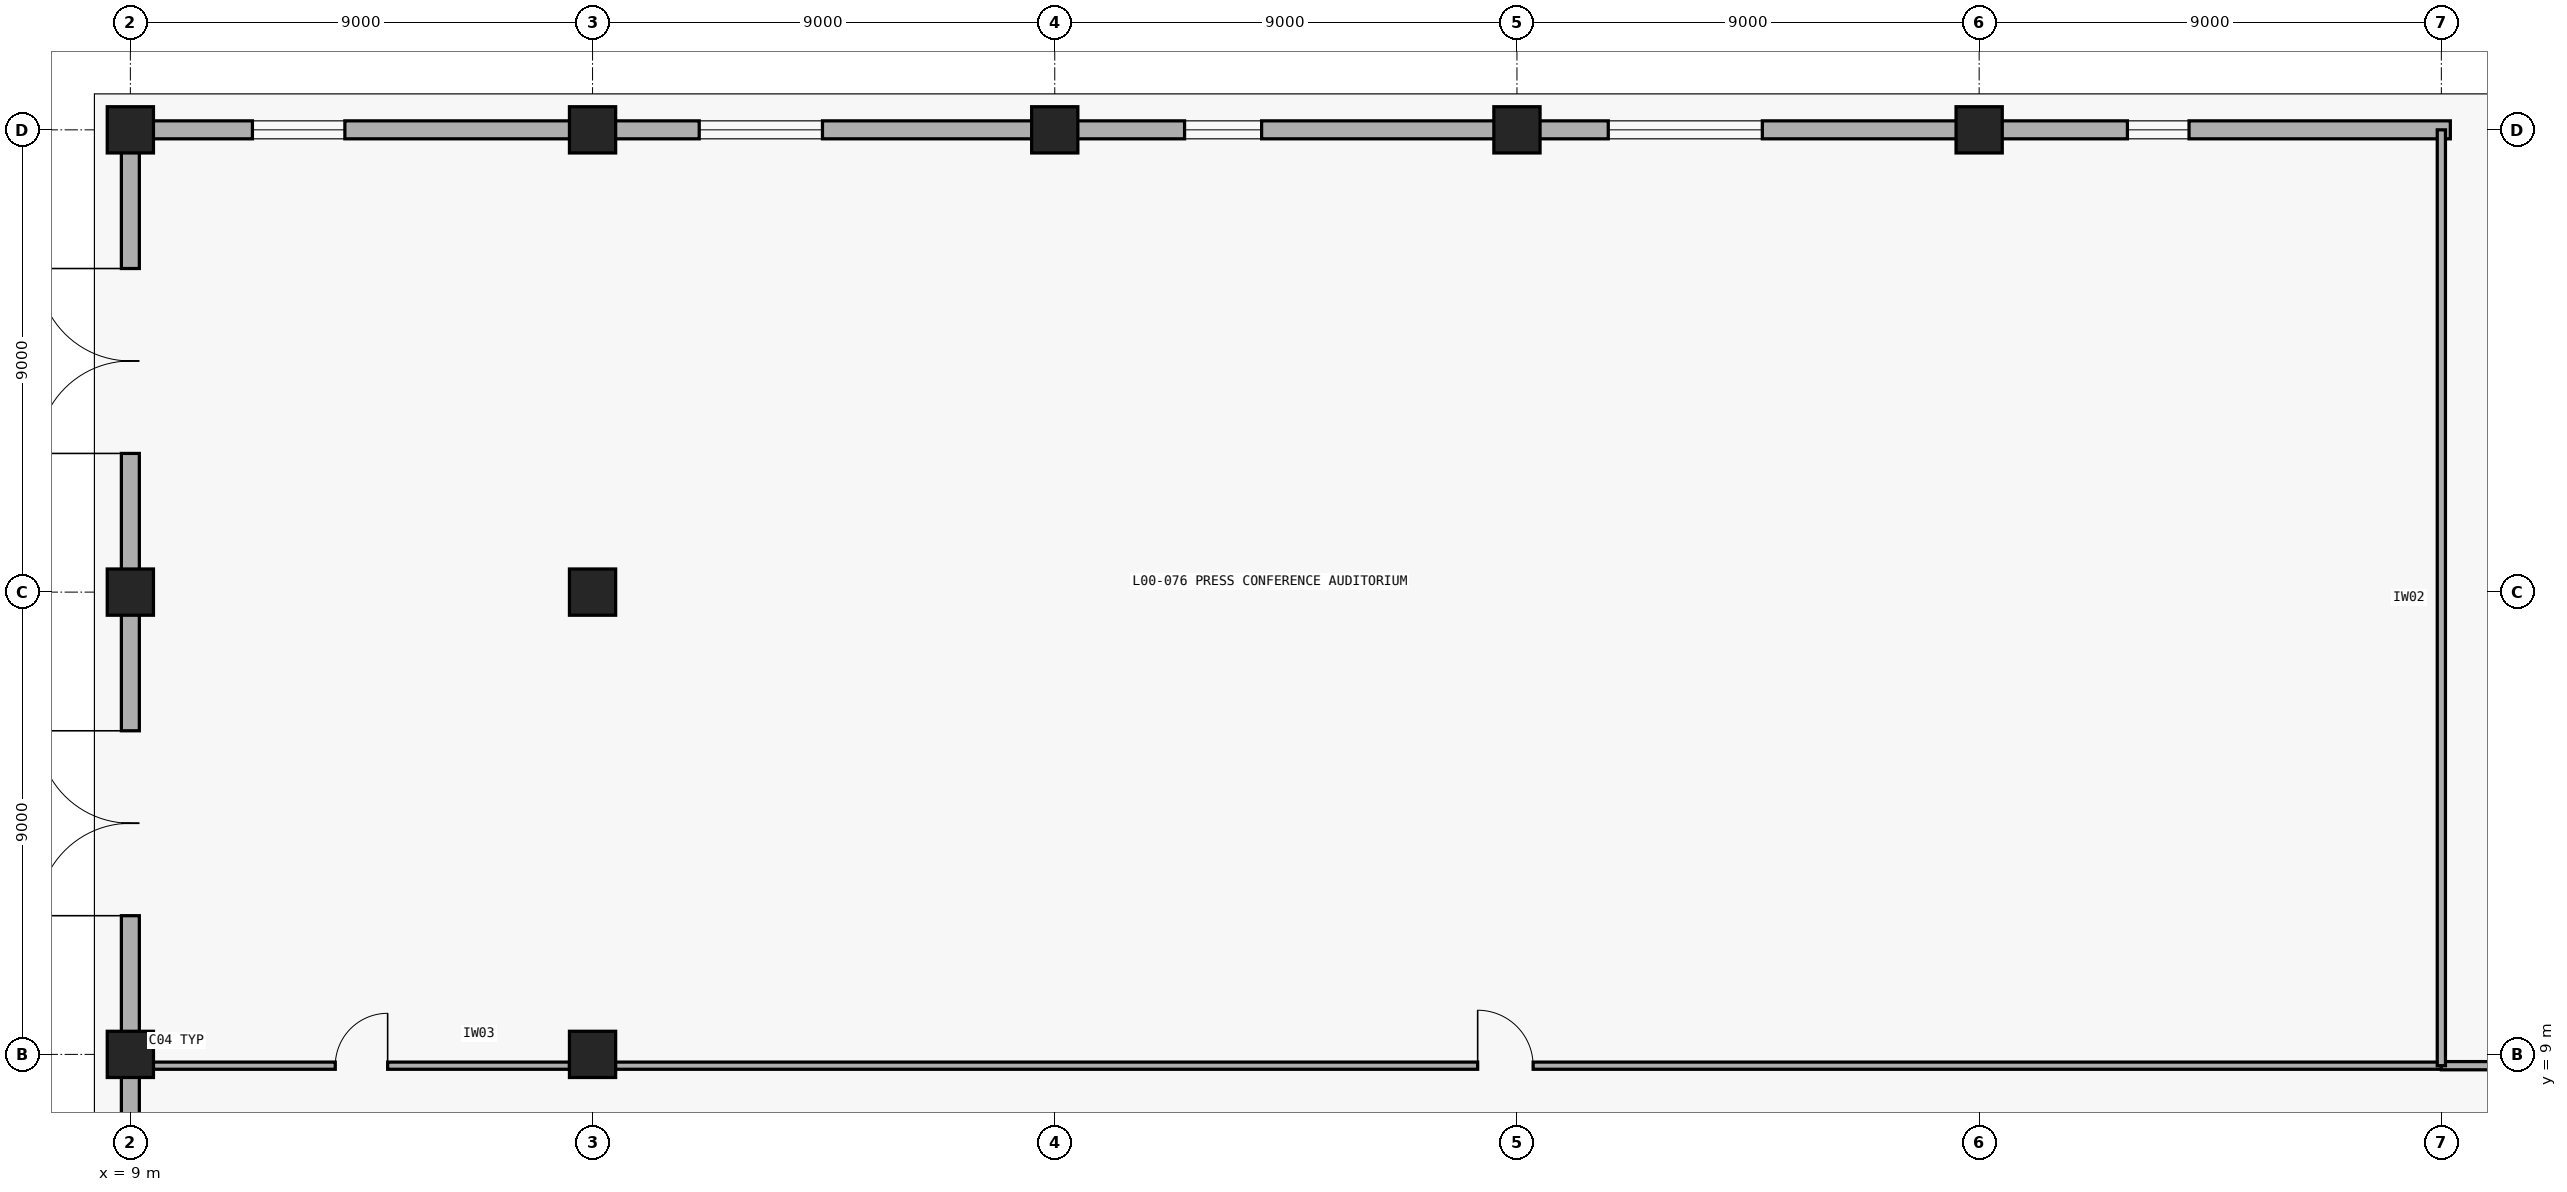
"""IFC4 building model, lengths in metres.
Left out: names, types, materials, properties, quantities, classifications, styles, units other than length and angle.
Written with IfcOpenShell. Run it as: python <this file> out.ifc"""

import sys

from ifc_helpers import new_model, si_unit, direction, frame, frame_2d, origin, origin_2d, place, context, subcontext, project, spatial, rectangle, extrude, element, fill, save


model = new_model("IFC4")
c1 = context("Model", 3, precision=1e-05, world=origin(), true_north=direction((0.0, 1.0)))
c2 = subcontext(c1, "Body", "Model", "MODEL_VIEW")
j1 = project(units=[si_unit("LENGTHUNIT", "METRE"), si_unit("PLANEANGLEUNIT", "RADIAN")], contexts=[c1])
p1 = place(None, origin())
s1 = spatial("IfcSite", under=j1, at=p1, CompositionType="ELEMENT")
p2 = place(p1, origin())
s2 = spatial("IfcBuilding", under=s1, at=p2, CompositionType="ELEMENT")
p3 = place(p2, origin())
s3 = spatial("IfcBuildingStorey", under=s2, at=p3, CompositionType="ELEMENT", Elevation=0.0)
for number, where, z_axis, x_axis in (
    (1, (9.0, 9.0, 0.0), (0.0, 0.0, 1.0), (1.0, 0.0, 0.0)),
    (2, (9.0, 18.0, 0.0), (0.0, 0.0, 1.0), (1.0, 0.0, 0.0)),
    (3, (9.0, 27.0, 0.0), (0.0, 0.0, 1.0), (1.0, 0.0, 0.0)),
    (4, (18.0, 9.0, 0.0), (0.0, 0.0, 1.0), (1.0, 0.0, 0.0)),
    (5, (18.0, 18.0, 0.0), (0.0, 0.0, 1.0), (1.0, 0.0, 0.0)),
    (6, (18.0, 27.0, 0.0), (0.0, 0.0, 1.0), (1.0, 0.0, 0.0)),
    (7, (27.0, 27.0, 0.0), (0.0, 0.0, 1.0), (1.0, 0.0, 0.0)),
    (8, (36.0, 27.0, 0.0), (0.0, 0.0, 1.0), (1.0, 0.0, 0.0)),
    (9, (45.0, 27.0, 0.0), (0.0, 0.0, 1.0), (1.0, 0.0, 0.0)),
):
    element("IfcColumn", number, at=place(p3, frame(where, z_axis=z_axis, x_axis=x_axis)), inside=s3, PredefinedType="COLUMN", context=c2, shape_type="SweptSolid", body=[
        extrude(rectangle(XDim=0.9, YDim=0.9, at=origin_2d()), origin(), (0.0, 0.0, 1.0), 5.4),
    ])
p4 = place(p3, frame((66.407, 27.071, 0.0), z_axis=(0.0, 0.0, 1.0), x_axis=(-0.842308733224, 0.538995359845, 0.0)))
e10 = element("IfcWall", 10, at=p4, inside=s3, PredefinedType="STANDARD", context=c2, shape_type="SweptSolid", body=[
    extrude(rectangle(XDim=21.139, YDim=0.35, at=frame_2d((10.57, 0.0))), origin(), (0.0, 0.0, 1.0), 4.165),
])
p5 = place(p4, frame((12.556, 0.0, 0.0)))
e11 = element("IfcOpeningElement", 11, at=p5, cuts=e10, PredefinedType="OPENING", context=c2, shape_type="SweptSolid", body=[
    extrude(rectangle(XDim=1.95, YDim=2.25, at=frame_2d((0.975, 1.125))), frame((0.0, 0.185, 0.0), z_axis=(0.0, -1.0, 0.0), x_axis=(1.0, 0.0, 0.0)), (0.0, 0.0, 1.0), 0.37),
])
p6 = place(p4, frame((1.51, 0.0, 0.0)))
e12 = element("IfcOpeningElement", 12, at=p6, cuts=e10, PredefinedType="OPENING", context=c2, shape_type="SweptSolid", body=[
    extrude(rectangle(XDim=2.9, YDim=2.52, at=frame_2d((1.45, 1.26))), frame((0.0, 0.185, 0.0), z_axis=(0.0, -1.0, 0.0), x_axis=(1.0, 0.0, 0.0)), (0.0, 0.0, 1.0), 0.37),
])
p7 = place(p3, frame((9.0, 0.425, 0.0), z_axis=(0.0, 0.0, 1.0), x_axis=(0.0, 1.0, 0.0)))
e13 = element("IfcWall", 13, at=p7, inside=s3, PredefinedType="STANDARD", context=c2, shape_type="SweptSolid", body=[
    extrude(rectangle(XDim=8.15, YDim=0.35, at=frame_2d((4.075, 0.0))), origin(), (0.0, 0.0, 1.0), 4.417),
])
p8 = place(p7, frame((2.275, 0.0, 0.0)))
e14 = element("IfcOpeningElement", 14, at=p8, cuts=e13, PredefinedType="OPENING", context=c2, shape_type="SweptSolid", body=[
    extrude(rectangle(XDim=3.6, YDim=2.7, at=frame_2d((1.8, 1.35))), frame((0.0, 0.185, 0.0), z_axis=(0.0, -1.0, 0.0), x_axis=(1.0, 0.0, 0.0)), (0.0, 0.0, 1.0), 0.37),
])
p9 = place(p3, frame((9.0, 9.425, 0.0), z_axis=(0.0, 0.0, 1.0), x_axis=(0.0, 1.0, 0.0)))
e15 = element("IfcWall", 15, at=p9, inside=s3, PredefinedType="STANDARD", context=c2, shape_type="SweptSolid", body=[
    extrude(rectangle(XDim=8.15, YDim=0.35, at=frame_2d((4.075, 0.0))), origin(), (0.0, 0.0, 1.0), 4.417),
])
p10 = place(p9, frame((2.275, 0.0, 0.0)))
e16 = element("IfcOpeningElement", 16, at=p10, cuts=e15, PredefinedType="OPENING", context=c2, shape_type="SweptSolid", body=[
    extrude(rectangle(XDim=3.6, YDim=2.7, at=frame_2d((1.8, 1.35))), frame((0.0, 0.185, 0.0), z_axis=(0.0, -1.0, 0.0), x_axis=(1.0, 0.0, 0.0)), (0.0, 0.0, 1.0), 0.37),
])
p11 = place(p3, frame((9.0, 18.425, 0.0), z_axis=(0.0, 0.0, 1.0), x_axis=(0.0, 1.0, 0.0)))
e17 = element("IfcWall", 17, at=p11, inside=s3, PredefinedType="STANDARD", context=c2, shape_type="SweptSolid", body=[
    extrude(rectangle(XDim=8.15, YDim=0.35, at=frame_2d((4.075, 0.0))), origin(), (0.0, 0.0, 1.0), 4.417),
])
p12 = place(p11, frame((2.275, 0.0, 0.0)))
e18 = element("IfcOpeningElement", 18, at=p12, cuts=e17, PredefinedType="OPENING", context=c2, shape_type="SweptSolid", body=[
    extrude(rectangle(XDim=3.6, YDim=2.7, at=frame_2d((1.8, 1.35))), frame((0.0, 0.185, 0.0), z_axis=(0.0, -1.0, 0.0), x_axis=(1.0, 0.0, 0.0)), (0.0, 0.0, 1.0), 0.37),
])
p13 = place(p3, frame((9.425, 27.0, 0.0), z_axis=(0.0, 0.0, 1.0), x_axis=(1.0, 0.0, 0.0)))
e19 = element("IfcWall", 19, at=p13, inside=s3, PredefinedType="STANDARD", context=c2, shape_type="SweptSolid", body=[
    extrude(rectangle(XDim=8.15, YDim=0.35, at=frame_2d((4.075, 0.0))), origin(), (0.0, 0.0, 1.0), 4.384),
])
p14 = place(p13, frame((1.952, 0.0, 0.95)))
e20 = element("IfcOpeningElement", 20, at=p14, cuts=e19, PredefinedType="OPENING", context=c2, shape_type="SweptSolid", body=[
    extrude(rectangle(XDim=1.8, YDim=2.2, at=frame_2d((0.9, 1.1))), frame((0.0, 0.185, 0.0), z_axis=(0.0, -1.0, 0.0), x_axis=(1.0, 0.0, 0.0)), (0.0, 0.0, 1.0), 0.37),
])
p15 = place(p3, frame((18.425, 27.0, 0.0), z_axis=(0.0, 0.0, 1.0), x_axis=(1.0, 0.0, 0.0)))
e21 = element("IfcWall", 21, at=p15, inside=s3, PredefinedType="STANDARD", context=c2, shape_type="SweptSolid", body=[
    extrude(rectangle(XDim=8.15, YDim=0.35, at=frame_2d((4.075, 0.0))), origin(), (0.0, 0.0, 1.0), 4.384),
])
p16 = place(p15, frame((1.652, 0.0, 0.95)))
e22 = element("IfcOpeningElement", 22, at=p16, cuts=e21, PredefinedType="OPENING", context=c2, shape_type="SweptSolid", body=[
    extrude(rectangle(XDim=2.4, YDim=2.2, at=frame_2d((1.2, 1.1))), frame((0.0, 0.185, 0.0), z_axis=(0.0, -1.0, 0.0), x_axis=(1.0, 0.0, 0.0)), (0.0, 0.0, 1.0), 0.37),
])
p17 = place(p3, frame((27.425, 27.0, 0.0), z_axis=(0.0, 0.0, 1.0), x_axis=(1.0, 0.0, 0.0)))
e23 = element("IfcWall", 23, at=p17, inside=s3, PredefinedType="STANDARD", context=c2, shape_type="SweptSolid", body=[
    extrude(rectangle(XDim=8.15, YDim=0.35, at=frame_2d((4.075, 0.0))), origin(), (0.0, 0.0, 1.0), 4.384),
])
p18 = place(p17, frame((2.103, 0.0, 0.95)))
e24 = element("IfcOpeningElement", 24, at=p18, cuts=e23, PredefinedType="OPENING", context=c2, shape_type="SweptSolid", body=[
    extrude(rectangle(XDim=1.5, YDim=2.0, at=frame_2d((0.75, 1.0))), frame((0.0, 0.185, 0.0), z_axis=(0.0, -1.0, 0.0), x_axis=(1.0, 0.0, 0.0)), (0.0, 0.0, 1.0), 0.37),
])
p19 = place(p3, frame((36.425, 27.0, 0.0), z_axis=(0.0, 0.0, 1.0), x_axis=(1.0, 0.0, 0.0)))
e25 = element("IfcWall", 25, at=p19, inside=s3, PredefinedType="STANDARD", context=c2, shape_type="SweptSolid", body=[
    extrude(rectangle(XDim=8.15, YDim=0.35, at=frame_2d((4.075, 0.0))), origin(), (0.0, 0.0, 1.0), 4.384),
])
p20 = place(p19, frame((1.353, 0.0, 0.95)))
e26 = element("IfcOpeningElement", 26, at=p20, cuts=e25, PredefinedType="OPENING", context=c2, shape_type="SweptSolid", body=[
    extrude(rectangle(XDim=3.0, YDim=2.3, at=frame_2d((1.5, 1.15))), frame((0.0, 0.185, 0.0), z_axis=(0.0, -1.0, 0.0), x_axis=(1.0, 0.0, 0.0)), (0.0, 0.0, 1.0), 0.37),
])
p21 = place(p3, frame((45.425, 27.0, 0.0), z_axis=(0.0, 0.0, 1.0), x_axis=(1.0, 0.0, 0.0)))
e27 = element("IfcWall", 27, at=p21, inside=s3, PredefinedType="STANDARD", context=c2, shape_type="SweptSolid", body=[
    extrude(rectangle(XDim=8.75, YDim=0.35, at=frame_2d((4.375, 0.0))), origin(), (0.0, 0.0, 1.0), 5.1),
])
p22 = place(p21, frame((2.462, 0.0, 0.95)))
e28 = element("IfcOpeningElement", 28, at=p22, cuts=e27, PredefinedType="OPENING", context=c2, shape_type="SweptSolid", body=[
    extrude(rectangle(XDim=1.2, YDim=1.8, at=frame_2d((0.6, 0.9))), frame((0.0, 0.185, 0.0), z_axis=(0.0, -1.0, 0.0), x_axis=(1.0, 0.0, 0.0)), (0.0, 0.0, 1.0), 0.37),
])
p23 = place(p3, frame((9.435, 8.78, 0.0), z_axis=(0.0, 0.0, 1.0), x_axis=(1.0, 0.0, 0.0)))
e29 = element("IfcWall", 29, at=p23, inside=s3, PredefinedType="PARTITIONING", context=c2, shape_type="SweptSolid", body=[
    extrude(rectangle(XDim=8.13, YDim=0.14, at=frame_2d((4.065, 0.0))), origin(), (0.0, 0.0, 1.0), 4.384),
])
p24 = place(p23, frame((3.555, 0.0, 0.0)))
e30 = element("IfcOpeningElement", 30, at=p24, cuts=e29, PredefinedType="OPENING", context=c2, shape_type="SweptSolid", body=[
    extrude(rectangle(XDim=1.02, YDim=2.2, at=frame_2d((0.51, 1.1))), frame((0.0, 0.08, 0.0), z_axis=(0.0, -1.0, 0.0), x_axis=(1.0, 0.0, 0.0)), (0.0, 0.0, 1.0), 0.16),
])
p25 = place(p3, frame((17.55, 8.78, 0.0), z_axis=(0.0, 0.0, 1.0), x_axis=(1.0, 0.0, 0.0)))
e31 = element("IfcWall", 31, at=p25, inside=s3, PredefinedType="PARTITIONING", context=c2, shape_type="SweptSolid", body=[
    extrude(rectangle(XDim=36.45, YDim=0.14, at=frame_2d((18.225, 0.0))), origin(), (0.0, 0.0, 1.0), 4.384),
])
p26 = place(p25, frame((17.685, 0.0, 0.0)))
e32 = element("IfcOpeningElement", 32, at=p26, cuts=e31, PredefinedType="OPENING", context=c2, shape_type="SweptSolid", body=[
    extrude(rectangle(XDim=1.08, YDim=2.2, at=frame_2d((0.54, 1.1))), frame((0.0, 0.08, 0.0), z_axis=(0.0, -1.0, 0.0), x_axis=(1.0, 0.0, 0.0)), (0.0, 0.0, 1.0), 0.16),
])
p27 = place(p3, frame((54.0, 8.78, 0.0), z_axis=(0.0, 0.0, 1.0), x_axis=(1.0, 0.0, 0.0)))
e33 = element("IfcWall", 33, at=p27, inside=s3, PredefinedType="PARTITIONING", context=c2, shape_type="SweptSolid", body=[
    extrude(rectangle(XDim=8.565, YDim=0.16, at=frame_2d((4.282, 0.0))), origin(), (0.0, 0.0, 1.0), 5.08),
])
p28 = place(p27, frame((3.722, 0.0, 0.0)))
e34 = element("IfcOpeningElement", 34, at=p28, cuts=e33, PredefinedType="OPENING", context=c2, shape_type="SweptSolid", body=[
    extrude(rectangle(XDim=1.12, YDim=2.25, at=frame_2d((0.56, 1.125))), frame((0.0, 0.09, 0.0), z_axis=(0.0, -1.0, 0.0), x_axis=(1.0, 0.0, 0.0)), (0.0, 0.0, 1.0), 0.18),
])
p29 = place(p3, frame((54.0, 8.78, 0.0), z_axis=(0.0, 0.0, 1.0), x_axis=(0.0, 1.0, 0.0)))
e35 = element("IfcWall", 35, at=p29, inside=s3, PredefinedType="PARTITIONING", context=c2, shape_type="SweptSolid", body=[
    extrude(rectangle(XDim=18.22, YDim=0.16, at=frame_2d((9.11, 0.0))), origin(), (0.0, 0.0, 1.0), 5.08),
])
p30 = place(p10, origin())
e36 = element("IfcDoor", 36, at=p30, inside=s3, OperationType="DOUBLE_DOOR_SINGLE_SWING", PredefinedType="DOOR", context=c2, shape_type="SweptSolid", body=[
    extrude(rectangle(XDim=3.6, YDim=2.7, at=frame_2d((1.8, 1.35))), frame((0.0, 0.025, 0.0), z_axis=(0.0, -1.0, 0.0), x_axis=(1.0, 0.0, 0.0)), (0.0, 0.0, 1.0), 0.05),
])
fill(e16, e36)
p31 = place(p12, origin())
e37 = element("IfcDoor", 37, at=p31, inside=s3, OperationType="DOUBLE_DOOR_SINGLE_SWING", PredefinedType="DOOR", context=c2, shape_type="SweptSolid", body=[
    extrude(rectangle(XDim=3.6, YDim=2.7, at=frame_2d((1.8, 1.35))), frame((0.0, 0.025, 0.0), z_axis=(0.0, -1.0, 0.0), x_axis=(1.0, 0.0, 0.0)), (0.0, 0.0, 1.0), 0.05),
])
fill(e18, e37)
p32 = place(p14, origin())
e38 = element("IfcWindow", 38, at=p32, inside=s3, PartitioningType="SINGLE_PANEL", PredefinedType="WINDOW", context=c2, shape_type="SweptSolid", body=[
    extrude(rectangle(XDim=1.8, YDim=2.2, at=frame_2d((0.9, 1.1))), frame((0.0, 0.03, 0.0), z_axis=(0.0, -1.0, 0.0), x_axis=(1.0, 0.0, 0.0)), (0.0, 0.0, 1.0), 0.06),
])
fill(e20, e38)
p33 = place(p16, origin())
e39 = element("IfcWindow", 39, at=p33, inside=s3, PartitioningType="SINGLE_PANEL", PredefinedType="WINDOW", context=c2, shape_type="SweptSolid", body=[
    extrude(rectangle(XDim=2.4, YDim=2.2, at=frame_2d((1.2, 1.1))), frame((0.0, 0.03, 0.0), z_axis=(0.0, -1.0, 0.0), x_axis=(1.0, 0.0, 0.0)), (0.0, 0.0, 1.0), 0.06),
])
fill(e22, e39)
p34 = place(p18, origin())
e40 = element("IfcWindow", 40, at=p34, inside=s3, PartitioningType="SINGLE_PANEL", PredefinedType="WINDOW", context=c2, shape_type="SweptSolid", body=[
    extrude(rectangle(XDim=1.5, YDim=2.0, at=frame_2d((0.75, 1.0))), frame((0.0, 0.03, 0.0), z_axis=(0.0, -1.0, 0.0), x_axis=(1.0, 0.0, 0.0)), (0.0, 0.0, 1.0), 0.06),
])
fill(e24, e40)
p35 = place(p20, origin())
e41 = element("IfcWindow", 41, at=p35, inside=s3, PartitioningType="SINGLE_PANEL", PredefinedType="WINDOW", context=c2, shape_type="SweptSolid", body=[
    extrude(rectangle(XDim=3.0, YDim=2.3, at=frame_2d((1.5, 1.15))), frame((0.0, 0.03, 0.0), z_axis=(0.0, -1.0, 0.0), x_axis=(1.0, 0.0, 0.0)), (0.0, 0.0, 1.0), 0.06),
])
fill(e26, e41)
p36 = place(p22, origin())
e42 = element("IfcWindow", 42, at=p36, inside=s3, PartitioningType="SINGLE_PANEL", PredefinedType="WINDOW", context=c2, shape_type="SweptSolid", body=[
    extrude(rectangle(XDim=1.2, YDim=1.8, at=frame_2d((0.6, 0.9))), frame((0.0, 0.03, 0.0), z_axis=(0.0, -1.0, 0.0), x_axis=(1.0, 0.0, 0.0)), (0.0, 0.0, 1.0), 0.06),
])
fill(e28, e42)
p37 = place(p24, origin())
e43 = element("IfcDoor", 43, at=p37, inside=s3, OperationType="SINGLE_SWING_RIGHT", PredefinedType="DOOR", context=c2, shape_type="SweptSolid", body=[
    extrude(rectangle(XDim=1.02, YDim=2.2, at=frame_2d((0.51, 1.1))), frame((0.0, 0.025, 0.0), z_axis=(0.0, -1.0, 0.0), x_axis=(1.0, 0.0, 0.0)), (0.0, 0.0, 1.0), 0.05),
])
fill(e30, e43)
p38 = place(p26, origin())
e44 = element("IfcDoor", 44, at=p38, inside=s3, OperationType="SINGLE_SWING_LEFT", PredefinedType="DOOR", context=c2, shape_type="SweptSolid", body=[
    extrude(rectangle(XDim=1.08, YDim=2.2, at=frame_2d((0.54, 1.1))), frame((0.0, 0.025, 0.0), z_axis=(0.0, -1.0, 0.0), x_axis=(1.0, 0.0, 0.0)), (0.0, 0.0, 1.0), 0.05),
])
fill(e32, e44)
save(model, sys.argv[1])
